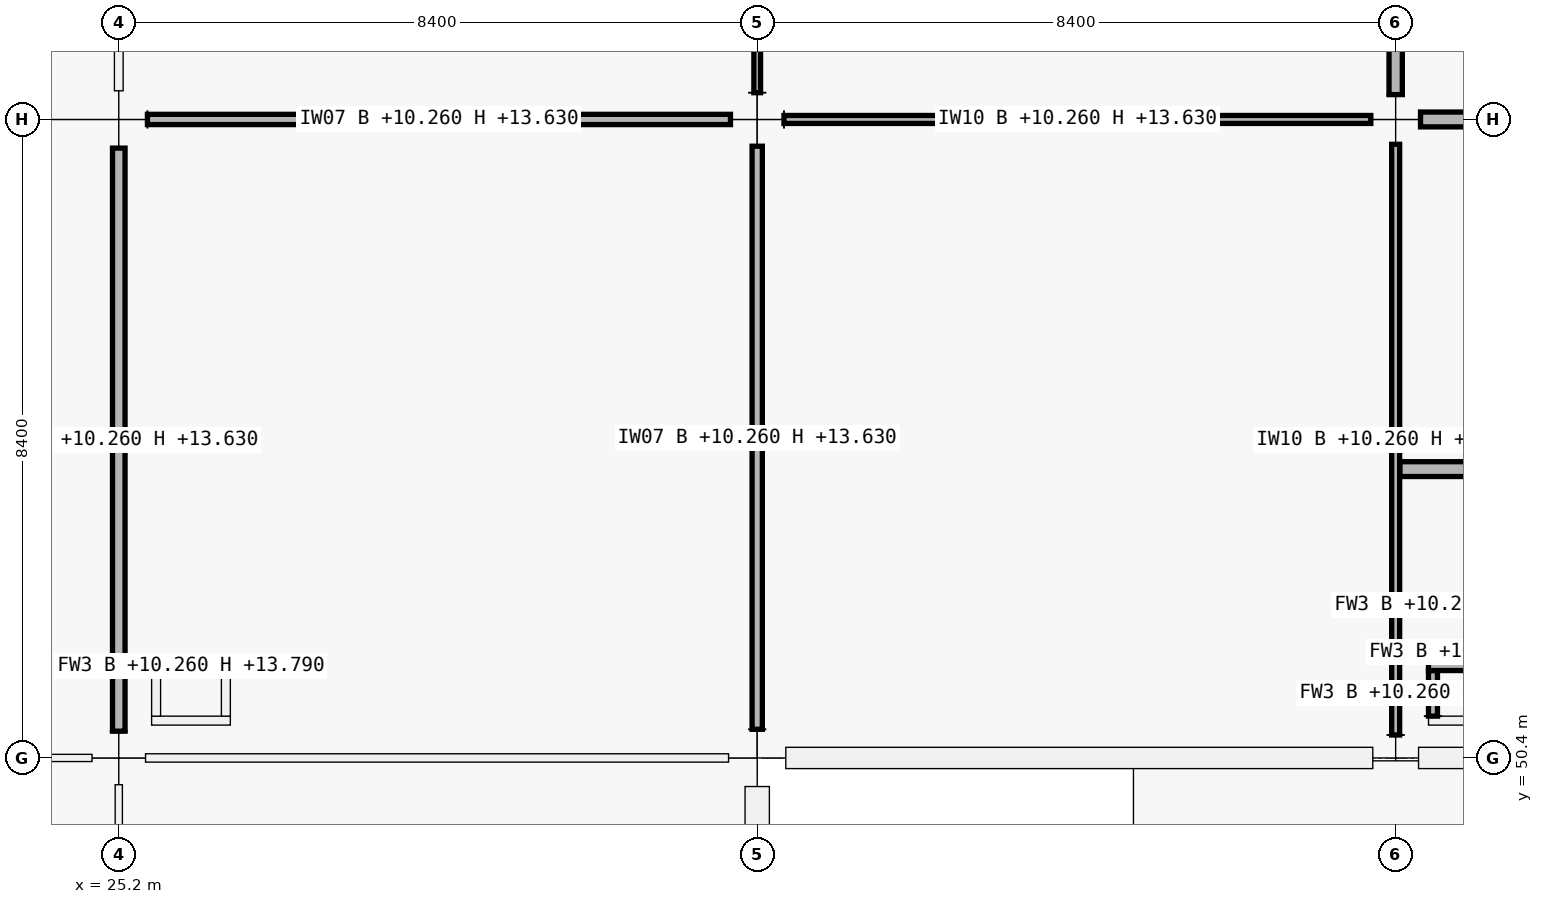
"""IFC4 building model, lengths in metres.
Left out: names, types, materials, properties, quantities, classifications, styles, units other than length and angle.
Written with IfcOpenShell. Run it as: python <this file> out.ifc"""

import sys

from ifc_helpers import new_model, si_unit, direction, frame, frame_2d, origin, origin_2d, place, context, subcontext, project, spatial, rectangle, extrude, element, fill, save


model = new_model("IFC4")
c1 = context("Model", 3, precision=1e-05, world=origin(), true_north=direction((0.0, 1.0)))
c2 = subcontext(c1, "Body", "Model", "MODEL_VIEW")
j1 = project(units=[si_unit("LENGTHUNIT", "METRE"), si_unit("PLANEANGLEUNIT", "RADIAN")], contexts=[c1])
p1 = place(None, origin())
s1 = spatial("IfcSite", under=j1, at=p1, CompositionType="ELEMENT")
p2 = place(p1, origin())
s2 = spatial("IfcBuilding", under=s1, at=p2, CompositionType="ELEMENT")
p3 = place(p2, frame((0.0, 0.0, 10.26)))
s3 = spatial("IfcBuildingStorey", under=s2, at=p3, CompositionType="ELEMENT", Elevation=10.26)
p4 = place(p3, frame((25.2, 50.4, 0.0), z_axis=(0.0, 0.0, 1.0), x_axis=(1.0, 0.0, 0.0)))
e1 = element("IfcColumn", 1, at=p4, inside=s3, PredefinedType="COLUMN", context=c2, shape_type="SweptSolid", body=[
    extrude(rectangle(XDim=0.7, YDim=0.7, at=origin_2d()), origin(), (0.0, 0.0, 1.0), 4.5),
])
for number, where, z_axis, x_axis in (
    (2, (25.2, 58.8, 0.0), (0.0, 0.0, 1.0), (1.0, 0.0, 0.0)),
    (3, (33.6, 50.4, 0.0), (0.0, 0.0, 1.0), (1.0, 0.0, 0.0)),
):
    element("IfcColumn", number, at=place(p3, frame(where, z_axis=z_axis, x_axis=x_axis)), inside=s3, PredefinedType="COLUMN", context=c2, shape_type="SweptSolid", body=[
        extrude(rectangle(XDim=0.75, YDim=0.75, at=origin_2d()), origin(), (0.0, 0.0, 1.0), 4.5),
    ])
p5 = place(p3, frame((33.6, 58.8, 0.0), z_axis=(0.0, 0.0, 1.0), x_axis=(1.0, 0.0, 0.0)))
e4 = element("IfcColumn", 4, at=p5, inside=s3, PredefinedType="COLUMN", context=c2, shape_type="SweptSolid", body=[
    extrude(rectangle(XDim=0.7, YDim=0.7, at=origin_2d()), origin(), (0.0, 0.0, 1.0), 4.5),
])
p6 = place(p3, frame((42.0, 50.4, 0.0), z_axis=(0.0, 0.0, 1.0), x_axis=(1.0, 0.0, 0.0)))
e5 = element("IfcColumn", 5, at=p6, inside=s3, PredefinedType="COLUMN", context=c2, shape_type="SweptSolid", body=[
    extrude(rectangle(XDim=0.6, YDim=0.6, at=origin_2d()), origin(), (0.0, 0.0, 1.0), 4.5),
])
p7 = place(p3, frame((42.0, 58.8, 0.0), z_axis=(0.0, 0.0, 1.0), x_axis=(1.0, 0.0, 0.0)))
e6 = element("IfcColumn", 6, at=p7, inside=s3, PredefinedType="COLUMN", context=c2, shape_type="SweptSolid", body=[
    extrude(rectangle(XDim=0.65, YDim=0.65, at=origin_2d()), origin(), (0.0, 0.0, 1.0), 4.5),
])
p8 = place(p3, frame((33.6, 50.024, 0.0), z_axis=(0.0, 0.0, 1.0), x_axis=(0.0, -1.0, 0.0)))
e7 = element("IfcWall", 7, at=p8, inside=s3, PredefinedType="SOLIDWALL", context=c2, shape_type="SweptSolid", body=[
    extrude(rectangle(XDim=7.673, YDim=0.32, at=frame_2d((3.836, 0.0))), origin(), (0.0, 0.0, 1.0), 3.54),
])
p9 = place(p8, frame((3.236, 0.0, 0.9)))
e8 = element("IfcOpeningElement", 8, at=p9, cuts=e7, PredefinedType="OPENING", context=c2, shape_type="SweptSolid", body=[
    extrude(rectangle(XDim=1.2, YDim=2.1, at=frame_2d((0.6, 1.05))), frame((0.0, 0.16, 0.0), z_axis=(0.0, -1.0, 0.0), x_axis=(1.0, 0.0, 0.0)), (0.0, 0.0, 1.0), 0.32),
])
p10 = place(p3, frame((41.699, 50.4, 0.0), z_axis=(0.0, 0.0, 1.0), x_axis=(-1.0, 0.0, 0.0)))
e9 = element("IfcWall", 9, at=p10, inside=s3, PredefinedType="SOLIDWALL", context=c2, shape_type="SweptSolid", body=[
    extrude(rectangle(XDim=7.723, YDim=0.28, at=frame_2d((3.861, 0.0))), origin(), (0.0, 0.0, 1.0), 3.54),
])
p11 = place(p10, frame((2.761, 0.0, 0.9)))
e10 = element("IfcOpeningElement", 10, at=p11, cuts=e9, PredefinedType="OPENING", context=c2, shape_type="SweptSolid", body=[
    extrude(rectangle(XDim=2.2, YDim=1.35, at=frame_2d((1.1, 0.675))), frame((0.0, 0.14, 0.0), z_axis=(0.0, -1.0, 0.0), x_axis=(1.0, 0.0, 0.0)), (0.0, 0.0, 1.0), 0.28),
])
p12 = place(p3, frame((50.074, 50.4, 0.0), z_axis=(0.0, 0.0, 1.0), x_axis=(-1.0, 0.0, 0.0)))
e11 = element("IfcWall", 11, at=p12, inside=s3, PredefinedType="SOLIDWALL", context=c2, shape_type="SweptSolid", body=[
    extrude(rectangle(XDim=7.773, YDim=0.28, at=frame_2d((3.886, 0.0))), origin(), (0.0, 0.0, 1.0), 3.54),
])
p13 = place(p12, frame((2.936, 0.0, 0.9)))
e12 = element("IfcOpeningElement", 12, at=p13, cuts=e11, PredefinedType="OPENING", context=c2, shape_type="SweptSolid", body=[
    extrude(rectangle(XDim=1.9, YDim=1.75, at=frame_2d((0.95, 0.875))), frame((0.0, 0.14, 0.0), z_axis=(0.0, -1.0, 0.0), x_axis=(1.0, 0.0, 0.0)), (0.0, 0.0, 1.0), 0.28),
])
for number, where, z_axis, x_axis in (
    (13, (25.632, 50.891, 0.0), (0.0, 0.0, 1.0), (1.0, 0.0, 0.0)),
    (14, (25.632, 51.609, 0.0), (0.0, 0.0, 1.0), (1.0, 0.0, 0.0)),
):
    element("IfcWall", number, at=place(p3, frame(where, z_axis=z_axis, x_axis=x_axis)), inside=s3, PredefinedType="PARTITIONING", context=c2, shape_type="SweptSolid", body=[
        extrude(rectangle(XDim=1.036, YDim=0.118, at=frame_2d((0.518, 0.0))), origin(), (0.0, 0.0, 1.0), 3.53),
    ])
for number, where, z_axis, x_axis in (
    (15, (25.691, 50.95, 0.0), (0.0, 0.0, 1.0), (0.0, 1.0, 0.0)),
    (16, (26.609, 50.95, 0.0), (0.0, 0.0, 1.0), (0.0, 1.0, 0.0)),
):
    element("IfcWall", number, at=place(p3, frame(where, z_axis=z_axis, x_axis=x_axis)), inside=s3, PredefinedType="PARTITIONING", context=c2, shape_type="SweptSolid", body=[
        extrude(rectangle(XDim=0.6, YDim=0.118, at=frame_2d((0.3, 0.0))), origin(), (0.0, 0.0, 1.0), 3.53),
    ])
for number, where, z_axis, x_axis in (
    (17, (42.432, 50.891, 0.0), (0.0, 0.0, 1.0), (1.0, 0.0, 0.0)),
    (18, (42.432, 51.609, 0.0), (0.0, 0.0, 1.0), (1.0, 0.0, 0.0)),
):
    element("IfcWall", number, at=place(p3, frame(where, z_axis=z_axis, x_axis=x_axis)), inside=s3, PredefinedType="PARTITIONING", context=c2, shape_type="SweptSolid", body=[
        extrude(rectangle(XDim=1.036, YDim=0.118, at=frame_2d((0.518, 0.0))), origin(), (0.0, 0.0, 1.0), 3.53),
    ])
p14 = place(p3, frame((42.491, 50.95, 0.0), z_axis=(0.0, 0.0, 1.0), x_axis=(0.0, 1.0, 0.0)))
e19 = element("IfcWall", 19, at=p14, inside=s3, PredefinedType="PARTITIONING", context=c2, shape_type="SweptSolid", body=[
    extrude(rectangle(XDim=0.6, YDim=0.118, at=frame_2d((0.3, 0.0))), origin(), (0.0, 0.0, 1.0), 3.53),
])
p15 = place(p3, frame((17.177, 50.4, 0.0), z_axis=(0.0, 0.0, 1.0), x_axis=(1.0, 0.0, 0.0)))
e20 = element("IfcWall", 20, at=p15, inside=s3, PredefinedType="PARTITIONING", context=c2, shape_type="SweptSolid", body=[
    extrude(rectangle(XDim=7.671, YDim=0.095, at=frame_2d((3.835, 0.0))), origin(), (0.0, 0.0, 1.0), 3.37),
])
p16 = place(p15, frame((0.608, 0.0, 0.0)))
e21 = element("IfcOpeningElement", 21, at=p16, cuts=e20, PredefinedType="OPENING", context=c2, shape_type="SweptSolid", body=[
    extrude(rectangle(XDim=0.96, YDim=2.1, at=frame_2d((0.48, 1.05))), frame((0.0, 0.047, 0.0), z_axis=(0.0, -1.0, 0.0), x_axis=(1.0, 0.0, 0.0)), (0.0, 0.0, 1.0), 0.095),
])
p17 = place(p15, frame((4.548, 0.0, 0.0)))
e22 = element("IfcOpeningElement", 22, at=p17, cuts=e20, PredefinedType="OPENING", context=c2, shape_type="SweptSolid", body=[
    extrude(rectangle(XDim=0.92, YDim=2.1, at=frame_2d((0.46, 1.05))), frame((0.0, 0.047, 0.0), z_axis=(0.0, -1.0, 0.0), x_axis=(1.0, 0.0, 0.0)), (0.0, 0.0, 1.0), 0.095),
])
p18 = place(p3, frame((25.552, 50.4, 0.0), z_axis=(0.0, 0.0, 1.0), x_axis=(1.0, 0.0, 0.0)))
e23 = element("IfcWall", 23, at=p18, inside=s3, PredefinedType="MOVABLE", context=c2, shape_type="SweptSolid", body=[
    extrude(rectangle(XDim=7.671, YDim=0.11, at=frame_2d((3.835, 0.0))), origin(), (0.0, 0.0, 1.0), 3.37),
])
p19 = place(p18, frame((3.296, 0.0, 0.0)))
e24 = element("IfcOpeningElement", 24, at=p19, cuts=e23, PredefinedType="OPENING", context=c2, shape_type="SweptSolid", body=[
    extrude(rectangle(XDim=1.08, YDim=2.25, at=frame_2d((0.54, 1.125))), frame((0.0, 0.055, 0.0), z_axis=(0.0, -1.0, 0.0), x_axis=(1.0, 0.0, 0.0)), (0.0, 0.0, 1.0), 0.11),
])
p20 = place(p3, frame((25.577, 58.8, 0.0), z_axis=(0.0, 0.0, 1.0), x_axis=(1.0, 0.0, 0.0)))
e25 = element("IfcWall", 25, at=p20, inside=s3, PredefinedType="PARTITIONING", context=c2, shape_type="SweptSolid", body=[
    extrude(rectangle(XDim=7.671, YDim=0.135, at=frame_2d((3.835, 0.0))), origin(), (0.0, 0.0, 1.0), 3.37),
])
p21 = place(p20, frame((3.306, 0.0, 0.0)))
e26 = element("IfcOpeningElement", 26, at=p21, cuts=e25, PredefinedType="OPENING", context=c2, shape_type="SweptSolid", body=[
    extrude(rectangle(XDim=1.06, YDim=2.25, at=frame_2d((0.53, 1.125))), frame((0.0, 0.067, 0.0), z_axis=(0.0, -1.0, 0.0), x_axis=(1.0, 0.0, 0.0)), (0.0, 0.0, 1.0), 0.135),
])
p22 = place(p3, frame((33.952, 58.8, 0.0), z_axis=(0.0, 0.0, 1.0), x_axis=(1.0, 0.0, 0.0)))
e27 = element("IfcWall", 27, at=p22, inside=s3, PredefinedType="PARTITIONING", context=c2, shape_type="SweptSolid", body=[
    extrude(rectangle(XDim=7.721, YDim=0.105, at=frame_2d((3.861, 0.0))), origin(), (0.0, 0.0, 1.0), 3.37),
])
p23 = place(p22, frame((3.351, 0.0, 0.0)))
e28 = element("IfcOpeningElement", 28, at=p23, cuts=e27, PredefinedType="OPENING", context=c2, shape_type="SweptSolid", body=[
    extrude(rectangle(XDim=1.02, YDim=2.2, at=frame_2d((0.51, 1.1))), frame((0.0, 0.052, 0.0), z_axis=(0.0, -1.0, 0.0), x_axis=(1.0, 0.0, 0.0)), (0.0, 0.0, 1.0), 0.105),
])
p24 = place(p3, frame((42.327, 58.8, 0.0), z_axis=(0.0, 0.0, 1.0), x_axis=(1.0, 0.0, 0.0)))
e29 = element("IfcWall", 29, at=p24, inside=s3, PredefinedType="PARTITIONING", context=c2, shape_type="SweptSolid", body=[
    extrude(rectangle(XDim=7.771, YDim=0.195, at=frame_2d((3.885, 0.0))), origin(), (0.0, 0.0, 1.0), 3.37),
])
p25 = place(p3, frame((25.2, 42.377, 0.0), z_axis=(0.0, 0.0, 1.0), x_axis=(0.0, 1.0, 0.0)))
e30 = element("IfcWall", 30, at=p25, inside=s3, PredefinedType="PARTITIONING", context=c2, shape_type="SweptSolid", body=[
    extrude(rectangle(XDim=7.671, YDim=0.095, at=frame_2d((3.835, 0.0))), origin(), (0.0, 0.0, 1.0), 3.37),
])
p26 = place(p3, frame((25.2, 50.752, 0.0), z_axis=(0.0, 0.0, 1.0), x_axis=(0.0, 1.0, 0.0)))
e31 = element("IfcWall", 31, at=p26, inside=s3, PredefinedType="PARTITIONING", context=c2, shape_type="SweptSolid", body=[
    extrude(rectangle(XDim=7.671, YDim=0.165, at=frame_2d((3.835, 0.0))), origin(), (0.0, 0.0, 1.0), 3.37),
])
p27 = place(p26, frame((3.306, 0.0, 0.0)))
e32 = element("IfcOpeningElement", 32, at=p27, cuts=e31, PredefinedType="OPENING", context=c2, shape_type="SweptSolid", body=[
    extrude(rectangle(XDim=1.06, YDim=2.25, at=frame_2d((0.53, 1.125))), frame((0.0, 0.083, 0.0), z_axis=(0.0, -1.0, 0.0), x_axis=(1.0, 0.0, 0.0)), (0.0, 0.0, 1.0), 0.165),
])
p28 = place(p3, frame((25.2, 59.177, 0.0), z_axis=(0.0, 0.0, 1.0), x_axis=(0.0, 1.0, 0.0)))
e33 = element("IfcWall", 33, at=p28, inside=s3, PredefinedType="PARTITIONING", context=c2, shape_type="SweptSolid", body=[
    extrude(rectangle(XDim=7.671, YDim=0.115, at=frame_2d((3.835, 0.0))), origin(), (0.0, 0.0, 1.0), 3.37),
])
p29 = place(p28, frame((3.316, 0.0, 0.0)))
e34 = element("IfcOpeningElement", 34, at=p29, cuts=e33, PredefinedType="OPENING", context=c2, shape_type="SweptSolid", body=[
    extrude(rectangle(XDim=1.04, YDim=2.2, at=frame_2d((0.52, 1.1))), frame((0.0, 0.058, 0.0), z_axis=(0.0, -1.0, 0.0), x_axis=(1.0, 0.0, 0.0)), (0.0, 0.0, 1.0), 0.115),
])
p30 = place(p3, frame((33.6, 50.777, 0.0), z_axis=(0.0, 0.0, 1.0), x_axis=(0.0, 1.0, 0.0)))
e35 = element("IfcWall", 35, at=p30, inside=s3, PredefinedType="PARTITIONING", context=c2, shape_type="SweptSolid", body=[
    extrude(rectangle(XDim=7.671, YDim=0.135, at=frame_2d((3.835, 0.0))), origin(), (0.0, 0.0, 1.0), 3.37),
])
p31 = place(p30, frame((3.336, 0.0, 0.0)))
e36 = element("IfcOpeningElement", 36, at=p31, cuts=e35, PredefinedType="OPENING", context=c2, shape_type="SweptSolid", body=[
    extrude(rectangle(XDim=1.0, YDim=2.2, at=frame_2d((0.5, 1.1))), frame((0.0, 0.067, 0.0), z_axis=(0.0, -1.0, 0.0), x_axis=(1.0, 0.0, 0.0)), (0.0, 0.0, 1.0), 0.135),
])
p32 = place(p3, frame((33.6, 59.152, 0.0), z_axis=(0.0, 0.0, 1.0), x_axis=(0.0, 1.0, 0.0)))
e37 = element("IfcWall", 37, at=p32, inside=s3, PredefinedType="PARTITIONING", context=c2, shape_type="SweptSolid", body=[
    extrude(rectangle(XDim=7.671, YDim=0.088, at=frame_2d((3.835, 0.0))), origin(), (0.0, 0.0, 1.0), 3.37),
])
p33 = place(p32, frame((3.365, 0.0, 0.0)))
e38 = element("IfcOpeningElement", 38, at=p33, cuts=e37, PredefinedType="OPENING", context=c2, shape_type="SweptSolid", body=[
    extrude(rectangle(XDim=0.94, YDim=2.15, at=frame_2d((0.47, 1.075))), frame((0.0, 0.044, 0.0), z_axis=(0.0, -1.0, 0.0), x_axis=(1.0, 0.0, 0.0)), (0.0, 0.0, 1.0), 0.088),
])
p34 = place(p3, frame((42.0, 50.702, 0.0), z_axis=(0.0, 0.0, 1.0), x_axis=(0.0, 1.0, 0.0)))
e39 = element("IfcWall", 39, at=p34, inside=s3, PredefinedType="PARTITIONING", context=c2, shape_type="SweptSolid", body=[
    extrude(rectangle(XDim=7.771, YDim=0.105, at=frame_2d((3.885, 0.0))), origin(), (0.0, 0.0, 1.0), 3.37),
])
p35 = place(p3, frame((42.0, 59.127, 0.0), z_axis=(0.0, 0.0, 1.0), x_axis=(0.0, 1.0, 0.0)))
e40 = element("IfcWall", 40, at=p35, inside=s3, PredefinedType="PARTITIONING", context=c2, shape_type="SweptSolid", body=[
    extrude(rectangle(XDim=7.721, YDim=0.175, at=frame_2d((3.86, 0.0))), origin(), (0.0, 0.0, 1.0), 3.37),
])
p36 = place(p3, frame((42.054, 54.2, 0.0), z_axis=(0.0, 0.0, 1.0), x_axis=(1.0, 0.0, 0.0)))
e41 = element("IfcWall", 41, at=p36, inside=s3, PredefinedType="PARTITIONING", context=c2, shape_type="SweptSolid", body=[
    extrude(rectangle(XDim=8.246, YDim=0.195, at=frame_2d((4.123, 0.0))), origin(), (0.0, 0.0, 1.0), 3.37),
])
p37 = place(p11, origin())
e42 = element("IfcWindow", 42, at=p37, inside=s3, PartitioningType="SINGLE_PANEL", PredefinedType="WINDOW", context=c2, shape_type="SweptSolid", body=[
    extrude(rectangle(XDim=2.2, YDim=1.35, at=frame_2d((1.1, 0.675))), frame((0.0, 0.03, 0.0), z_axis=(0.0, -1.0, 0.0), x_axis=(1.0, 0.0, 0.0)), (0.0, 0.0, 1.0), 0.06),
])
fill(e10, e42)
p38 = place(p27, origin())
e43 = element("IfcDoor", 43, at=p38, inside=s3, OperationType="SINGLE_SWING_LEFT", PredefinedType="DOOR", context=c2, shape_type="SweptSolid", body=[
    extrude(rectangle(XDim=1.06, YDim=2.25, at=frame_2d((0.53, 1.125))), frame((0.0, 0.025, 0.0), z_axis=(0.0, -1.0, 0.0), x_axis=(1.0, 0.0, 0.0)), (0.0, 0.0, 1.0), 0.05),
])
fill(e32, e43)
p39 = place(p23, origin())
e44 = element("IfcDoor", 44, at=p39, inside=s3, OperationType="SINGLE_SWING_LEFT", PredefinedType="DOOR", context=c2, shape_type="SweptSolid", body=[
    extrude(rectangle(XDim=1.02, YDim=2.2, at=frame_2d((0.51, 1.1))), frame((0.0, 0.025, 0.0), z_axis=(0.0, -1.0, 0.0), x_axis=(1.0, 0.0, 0.0)), (0.0, 0.0, 1.0), 0.05),
])
fill(e28, e44)
p40 = place(p31, origin())
e45 = element("IfcDoor", 45, at=p40, inside=s3, OperationType="SINGLE_SWING_LEFT", PredefinedType="DOOR", context=c2, shape_type="SweptSolid", body=[
    extrude(rectangle(XDim=1.0, YDim=2.2, at=frame_2d((0.5, 1.1))), frame((0.0, 0.025, 0.0), z_axis=(0.0, -1.0, 0.0), x_axis=(1.0, 0.0, 0.0)), (0.0, 0.0, 1.0), 0.05),
])
fill(e36, e45)
p41 = place(p19, origin())
e46 = element("IfcDoor", 46, at=p41, inside=s3, OperationType="SINGLE_SWING_RIGHT", PredefinedType="DOOR", context=c2, shape_type="SweptSolid", body=[
    extrude(rectangle(XDim=1.08, YDim=2.25, at=frame_2d((0.54, 1.125))), frame((0.0, 0.025, 0.0), z_axis=(0.0, -1.0, 0.0), x_axis=(1.0, 0.0, 0.0)), (0.0, 0.0, 1.0), 0.05),
])
fill(e24, e46)
p42 = place(p21, origin())
e47 = element("IfcDoor", 47, at=p42, inside=s3, OperationType="SINGLE_SWING_LEFT", PredefinedType="DOOR", context=c2, shape_type="SweptSolid", body=[
    extrude(rectangle(XDim=1.06, YDim=2.25, at=frame_2d((0.53, 1.125))), frame((0.0, 0.025, 0.0), z_axis=(0.0, -1.0, 0.0), x_axis=(1.0, 0.0, 0.0)), (0.0, 0.0, 1.0), 0.05),
])
fill(e26, e47)
save(model, sys.argv[1])
